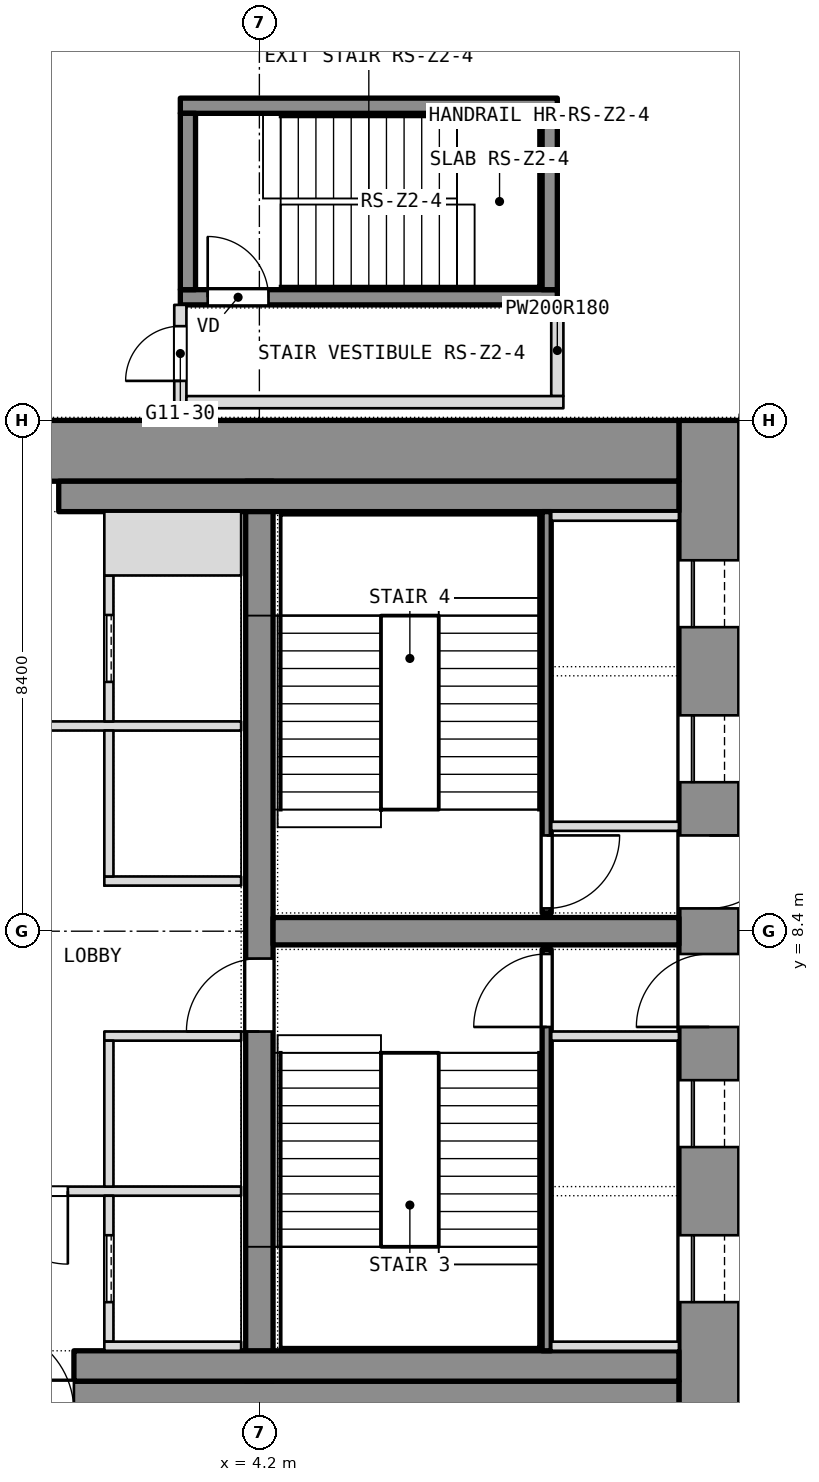
"""IFC4 building model, lengths in metres.
Left out: names, types, materials, properties, quantities, classifications, styles, units other than length and angle.
Written with IfcOpenShell. Run it as: python <this file> out.ifc"""

import sys

from ifc_helpers import new_model, si_unit, direction, frame, frame_2d, origin, place, context, subcontext, project, spatial, rectangle, extrude, element, fill, save


model = new_model("IFC4")
c1 = context("Model", 3, precision=1e-05, world=origin(), true_north=direction((0.0, 1.0)))
c2 = subcontext(c1, "Body", "Model", "MODEL_VIEW")
j1 = project(units=[si_unit("LENGTHUNIT", "METRE"), si_unit("PLANEANGLEUNIT", "RADIAN")], contexts=[c1])
p1 = place(None, origin())
s1 = spatial("IfcSite", under=j1, at=p1, CompositionType="ELEMENT")
p2 = place(p1, origin())
s2 = spatial("IfcBuilding", under=s1, at=p2, CompositionType="ELEMENT")
p3 = place(p2, frame((0.0, 0.0, 133.7)))
s3 = spatial("IfcBuildingStorey", under=s2, at=p3, CompositionType="ELEMENT", Elevation=133.7)
p4 = place(p3, frame((11.6, 0.0, 0.0), z_axis=(0.0, 0.0, 1.0), x_axis=(0.0, 1.0, 0.0)))
e1 = element("IfcWall", 1, at=p4, inside=s3, PredefinedType="SHEAR", context=c2, shape_type="SweptSolid", body=[
    extrude(rectangle(XDim=16.8, YDim=1.0, at=frame_2d((8.4, 0.0))), origin(), (0.0, 0.0, 1.0), 3.6),
])
p5 = place(p4, frame((2.3, 0.0, 0.0)))
e2 = element("IfcOpeningElement", 2, at=p5, cuts=e1, PredefinedType="OPENING", context=c2, shape_type="SweptSolid", body=[
    extrude(rectangle(XDim=1.1, YDim=2.1, at=frame_2d((0.55, 1.05))), frame((0.0, 0.5, 0.0), z_axis=(0.0, -1.0, 0.0), x_axis=(1.0, 0.0, 0.0)), (0.0, 0.0, 1.0), 1.0),
])
p6 = place(p4, frame((4.85, 0.0, 0.0)))
e3 = element("IfcOpeningElement", 3, at=p6, cuts=e1, PredefinedType="OPENING", context=c2, shape_type="SweptSolid", body=[
    extrude(rectangle(XDim=1.1, YDim=2.1, at=frame_2d((0.55, 1.05))), frame((0.0, 0.5, 0.0), z_axis=(0.0, -1.0, 0.0), x_axis=(1.0, 0.0, 0.0)), (0.0, 0.0, 1.0), 1.0),
])
p7 = place(p4, frame((6.825, 0.0, 0.0)))
e4 = element("IfcOpeningElement", 4, at=p7, cuts=e1, PredefinedType="OPENING", context=c2, shape_type="SweptSolid", body=[
    extrude(rectangle(XDim=1.2, YDim=2.1, at=frame_2d((0.6, 1.05))), frame((0.0, 0.5, 0.0), z_axis=(0.0, -1.0, 0.0), x_axis=(1.0, 0.0, 0.0)), (0.0, 0.0, 1.0), 1.0),
])
p8 = place(p4, frame((13.4, 0.0, 0.0)))
e5 = element("IfcOpeningElement", 5, at=p8, cuts=e1, PredefinedType="OPENING", context=c2, shape_type="SweptSolid", body=[
    extrude(rectangle(XDim=1.1, YDim=2.1, at=frame_2d((0.55, 1.05))), frame((0.0, 0.5, 0.0), z_axis=(0.0, -1.0, 0.0), x_axis=(1.0, 0.0, 0.0)), (0.0, 0.0, 1.0), 1.0),
])
p9 = place(p4, frame((10.85, 0.0, 0.0)))
e6 = element("IfcOpeningElement", 6, at=p9, cuts=e1, PredefinedType="OPENING", context=c2, shape_type="SweptSolid", body=[
    extrude(rectangle(XDim=1.1, YDim=2.1, at=frame_2d((0.55, 1.05))), frame((0.0, 0.5, 0.0), z_axis=(0.0, -1.0, 0.0), x_axis=(1.0, 0.0, 0.0)), (0.0, 0.0, 1.0), 1.0),
])
p10 = place(p4, frame((8.775, 0.0, 0.0)))
e7 = element("IfcOpeningElement", 7, at=p10, cuts=e1, PredefinedType="OPENING", context=c2, shape_type="SweptSolid", body=[
    extrude(rectangle(XDim=1.2, YDim=2.1, at=frame_2d((0.6, 1.05))), frame((0.0, 0.5, 0.0), z_axis=(0.0, -1.0, 0.0), x_axis=(1.0, 0.0, 0.0)), (0.0, 0.0, 1.0), 1.0),
])
p11 = place(p3, frame((-11.1, 0.5, 0.0), z_axis=(0.0, 0.0, 1.0), x_axis=(1.0, 0.0, 0.0)))
e8 = element("IfcWall", 8, at=p11, inside=s3, PredefinedType="SHEAR", context=c2, shape_type="SweptSolid", body=[
    extrude(rectangle(XDim=22.2, YDim=1.0, at=frame_2d((11.1, 0.0))), origin(), (0.0, 0.0, 1.0), 3.6),
])
p12 = place(p11, frame((10.85, 0.0, 0.0)))
e9 = element("IfcOpeningElement", 9, at=p12, cuts=e8, PredefinedType="OPENING", context=c2, shape_type="SweptSolid", body=[
    extrude(rectangle(XDim=1.4, YDim=2.1, at=frame_2d((0.7, 1.05))), frame((0.0, 0.5, 0.0), z_axis=(0.0, -1.0, 0.0), x_axis=(1.0, 0.0, 0.0)), (0.0, 0.0, 1.0), 1.0),
])
p13 = place(p3, frame((-11.1, 16.3, 0.0), z_axis=(0.0, 0.0, 1.0), x_axis=(1.0, 0.0, 0.0)))
e10 = element("IfcWall", 10, at=p13, inside=s3, PredefinedType="SHEAR", context=c2, shape_type="SweptSolid", body=[
    extrude(rectangle(XDim=22.2, YDim=1.0, at=frame_2d((11.1, 0.0))), origin(), (0.0, 0.0, 1.0), 3.6),
])
p14 = place(p13, frame((10.4, 0.0, 0.0)))
e11 = element("IfcOpeningElement", 11, at=p14, cuts=e10, PredefinedType="OPENING", context=c2, shape_type="SweptSolid", body=[
    extrude(rectangle(XDim=1.4, YDim=2.1, at=frame_2d((0.7, 1.05))), frame((0.0, 0.5, 0.0), z_axis=(0.0, -1.0, 0.0), x_axis=(1.0, 0.0, 0.0)), (0.0, 0.0, 1.0), 1.0),
])
p15 = place(p3, frame((4.2, 1.0, 0.0), z_axis=(0.0, 0.0, 1.0), x_axis=(0.0, 1.0, 0.0)))
e12 = element("IfcWall", 12, at=p15, inside=s3, PredefinedType="SHEAR", context=c2, shape_type="SweptSolid", body=[
    extrude(rectangle(XDim=14.8, YDim=0.45, at=frame_2d((7.4, 0.0))), origin(), (0.0, 0.0, 1.0), 3.6),
])
p16 = place(p15, frame((5.75, 0.0, 0.0)))
e13 = element("IfcOpeningElement", 13, at=p16, cuts=e12, PredefinedType="OPENING", context=c2, shape_type="SweptSolid", body=[
    extrude(rectangle(XDim=1.2, YDim=2.1, at=frame_2d((0.6, 1.05))), frame((0.0, 0.225, 0.0), z_axis=(0.0, -1.0, 0.0), x_axis=(1.0, 0.0, 0.0)), (0.0, 0.0, 1.0), 0.45),
])
p17 = place(p3, frame((4.425, 8.4, 0.0), z_axis=(0.0, 0.0, 1.0), x_axis=(1.0, 0.0, 0.0)))
e14 = element("IfcWall", 14, at=p17, inside=s3, PredefinedType="SHEAR", context=c2, shape_type="SweptSolid", body=[
    extrude(rectangle(XDim=6.675, YDim=0.45, at=frame_2d((3.337, 0.0))), origin(), (0.0, 0.0, 1.0), 3.6),
])
p18 = place(p3, frame((9.1, 17.2, 0.0), z_axis=(0.0, 0.0, 1.0), x_axis=(0.0, 1.0, 0.0)))
e15 = element("IfcWall", 15, at=p18, inside=s3, PredefinedType="PARTITIONING", context=c2, shape_type="SweptSolid", body=[
    extrude(rectangle(XDim=1.5, YDim=0.2, at=frame_2d((0.75, 0.0))), origin(), (0.0, 0.0, 1.0), 3.34),
])
p19 = place(p3, frame((2.9, 17.0, 0.0), z_axis=(0.0, 0.0, 1.0), x_axis=(0.0, 1.0, 0.0)))
e16 = element("IfcWall", 16, at=p19, inside=s3, PredefinedType="PARTITIONING", context=c2, shape_type="SweptSolid", body=[
    extrude(rectangle(XDim=1.7, YDim=0.2, at=frame_2d((0.85, 0.0))), origin(), (0.0, 0.0, 1.0), 3.34),
])
p20 = place(p19, frame((0.45, 0.0, 0.0)))
e17 = element("IfcOpeningElement", 17, at=p20, cuts=e16, PredefinedType="OPENING", context=c2, shape_type="SweptSolid", body=[
    extrude(rectangle(XDim=0.9, YDim=2.1, at=frame_2d((0.45, 1.05))), frame((0.0, 0.1, 0.0), z_axis=(0.0, -1.0, 0.0), x_axis=(1.0, 0.0, 0.0)), (0.0, 0.0, 1.0), 0.2),
])
p21 = place(p3, frame((3.0, 17.1, 0.0), z_axis=(0.0, 0.0, 1.0), x_axis=(1.0, 0.0, 0.0)))
e18 = element("IfcWall", 18, at=p21, inside=s3, PredefinedType="PARTITIONING", context=c2, shape_type="SweptSolid", body=[
    extrude(rectangle(XDim=6.2, YDim=0.2, at=frame_2d((3.1, 0.0))), origin(), (0.0, 0.0, 1.0), 3.34),
])
p22 = place(p3, frame((1.15, 1.25, 0.0), z_axis=(0.0, 0.0, 1.0), x_axis=(1.0, 0.0, 0.0)))
e19 = element("IfcWall", 19, at=p22, inside=s3, PredefinedType="PARTITIONING", context=c2, shape_type="SweptSolid", body=[
    extrude(rectangle(XDim=9.95, YDim=0.5, at=frame_2d((4.975, 0.0))), origin(), (0.0, 0.0, 1.0), 3.34),
])
p23 = place(p3, frame((0.9, 15.55, 0.0), z_axis=(0.0, 0.0, 1.0), x_axis=(1.0, 0.0, 0.0)))
e20 = element("IfcWall", 20, at=p23, inside=s3, PredefinedType="PARTITIONING", context=c2, shape_type="SweptSolid", body=[
    extrude(rectangle(XDim=10.2, YDim=0.5, at=frame_2d((5.1, 0.0))), origin(), (0.0, 0.0, 1.0), 3.34),
])
p24 = place(p3, frame((8.925, 1.5, 0.0), z_axis=(0.0, 0.0, 1.0), x_axis=(0.0, 1.0, 0.0)))
e21 = element("IfcWall", 21, at=p24, inside=s3, PredefinedType="SHEAR", context=c2, shape_type="SweptSolid", body=[
    extrude(rectangle(XDim=6.6, YDim=0.15, at=frame_2d((3.3, 0.0))), origin(), (0.0, 0.0, 1.0), 3.34),
])
p25 = place(p24, frame((5.325, 0.0, 0.0)))
e22 = element("IfcOpeningElement", 22, at=p25, cuts=e21, PredefinedType="OPENING", context=c2, shape_type="SweptSolid", body=[
    extrude(rectangle(XDim=1.2, YDim=2.1, at=frame_2d((0.6, 1.05))), frame((0.0, 0.075, 0.0), z_axis=(0.0, -1.0, 0.0), x_axis=(1.0, 0.0, 0.0)), (0.0, 0.0, 1.0), 0.15),
])
for number, where, z_axis, x_axis in (
    (23, (9.0, 6.675, 0.0), (0.0, 0.0, 1.0), (1.0, 0.0, 0.0)),
    (24, (9.0, 1.575, 0.0), (0.0, 0.0, 1.0), (1.0, 0.0, 0.0)),
):
    element("IfcWall", number, at=place(p3, frame(where, z_axis=z_axis, x_axis=x_axis)), inside=s3, PredefinedType="SHEAR", context=c2, shape_type="SweptSolid", body=[
        extrude(rectangle(XDim=2.1, YDim=0.15, at=frame_2d((1.05, 0.0))), origin(), (0.0, 0.0, 1.0), 3.6),
    ])
p26 = place(p3, frame((8.925, 8.7, 0.0), z_axis=(0.0, 0.0, 1.0), x_axis=(0.0, 1.0, 0.0)))
e25 = element("IfcWall", 25, at=p26, inside=s3, PredefinedType="SHEAR", context=c2, shape_type="SweptSolid", body=[
    extrude(rectangle(XDim=6.6, YDim=0.15, at=frame_2d((3.3, 0.0))), origin(), (0.0, 0.0, 1.0), 3.34),
])
p27 = place(p26, frame((0.075, 0.0, 0.0)))
e26 = element("IfcOpeningElement", 26, at=p27, cuts=e25, PredefinedType="OPENING", context=c2, shape_type="SweptSolid", body=[
    extrude(rectangle(XDim=1.2, YDim=2.1, at=frame_2d((0.6, 1.05))), frame((0.0, 0.075, 0.0), z_axis=(0.0, -1.0, 0.0), x_axis=(1.0, 0.0, 0.0)), (0.0, 0.0, 1.0), 0.15),
])
for number, where, z_axis, x_axis in (
    (27, (9.0, 10.125, 0.0), (0.0, 0.0, 1.0), (1.0, 0.0, 0.0)),
    (28, (9.0, 15.225, 0.0), (0.0, 0.0, 1.0), (1.0, 0.0, 0.0)),
):
    element("IfcWall", number, at=place(p3, frame(where, z_axis=z_axis, x_axis=x_axis)), inside=s3, PredefinedType="SHEAR", context=c2, shape_type="SweptSolid", body=[
        extrude(rectangle(XDim=2.1, YDim=0.15, at=frame_2d((1.05, 0.0))), origin(), (0.0, 0.0, 1.0), 3.6),
    ])
p28 = place(p3, frame((-3.9, 4.125, 0.0), z_axis=(0.0, 0.0, 1.0), x_axis=(1.0, 0.0, 0.0)))
e29 = element("IfcWall", 29, at=p28, inside=s3, PredefinedType="PARTITIONING", context=c2, shape_type="SweptSolid", body=[
    extrude(rectangle(XDim=7.8, YDim=0.15, at=frame_2d((3.9, 0.0))), origin(), (0.0, 0.0, 1.0), 3.34),
])
p29 = place(p28, frame((3.75, 0.0, 0.0)))
e30 = element("IfcOpeningElement", 30, at=p29, cuts=e29, PredefinedType="OPENING", context=c2, shape_type="SweptSolid", body=[
    extrude(rectangle(XDim=1.2, YDim=2.1, at=frame_2d((0.6, 1.05))), frame((0.0, 0.075, 0.0), z_axis=(0.0, -1.0, 0.0), x_axis=(1.0, 0.0, 0.0)), (0.0, 0.0, 1.0), 0.15),
])
p30 = place(p3, frame((-3.9, 11.775, 0.0), z_axis=(0.0, 0.0, 1.0), x_axis=(1.0, 0.0, 0.0)))
e31 = element("IfcWall", 31, at=p30, inside=s3, PredefinedType="PARTITIONING", context=c2, shape_type="SweptSolid", body=[
    extrude(rectangle(XDim=7.8, YDim=0.15, at=frame_2d((3.9, 0.0))), origin(), (0.0, 0.0, 1.0), 3.34),
])
p31 = place(p30, frame((3.3, 0.0, 0.0)))
e32 = element("IfcOpeningElement", 32, at=p31, cuts=e31, PredefinedType="OPENING", context=c2, shape_type="SweptSolid", body=[
    extrude(rectangle(XDim=1.2, YDim=2.1, at=frame_2d((0.6, 1.05))), frame((0.0, 0.075, 0.0), z_axis=(0.0, -1.0, 0.0), x_axis=(1.0, 0.0, 0.0)), (0.0, 0.0, 1.0), 0.15),
])
p32 = place(p3, frame((1.725, 1.65, 0.0), z_axis=(0.0, 0.0, 1.0), x_axis=(0.0, 1.0, 0.0)))
e33 = element("IfcWall", 33, at=p32, inside=s3, PredefinedType="SHEAR", context=c2, shape_type="SweptSolid", body=[
    extrude(rectangle(XDim=2.4, YDim=0.15, at=frame_2d((1.2, 0.0))), origin(), (0.0, 0.0, 1.0), 3.6),
])
p33 = place(p32, frame((0.65, 0.0, 0.0)))
e34 = element("IfcOpeningElement", 34, at=p33, cuts=e33, PredefinedType="OPENING", context=c2, shape_type="SweptSolid", body=[
    extrude(rectangle(XDim=1.1, YDim=2.1, at=frame_2d((0.55, 1.05))), frame((0.0, 0.075, 0.0), z_axis=(0.0, -1.0, 0.0), x_axis=(1.0, 0.0, 0.0)), (0.0, 0.0, 1.0), 0.15),
])
p34 = place(p3, frame((1.65, 1.575, 0.0), z_axis=(0.0, 0.0, 1.0), x_axis=(1.0, 0.0, 0.0)))
e35 = element("IfcWall", 35, at=p34, inside=s3, PredefinedType="SHEAR", context=c2, shape_type="SweptSolid", body=[
    extrude(rectangle(XDim=2.25, YDim=0.15, at=frame_2d((1.125, 0.0))), origin(), (0.0, 0.0, 1.0), 3.6),
])
p35 = place(p3, frame((1.725, 11.85, 0.0), z_axis=(0.0, 0.0, 1.0), x_axis=(0.0, 1.0, 0.0)))
e36 = element("IfcWall", 36, at=p35, inside=s3, PredefinedType="SHEAR", context=c2, shape_type="SweptSolid", body=[
    extrude(rectangle(XDim=2.4, YDim=0.15, at=frame_2d((1.2, 0.0))), origin(), (0.0, 0.0, 1.0), 3.6),
])
p36 = place(p35, frame((0.65, 0.0, 0.0)))
e37 = element("IfcOpeningElement", 37, at=p36, cuts=e36, PredefinedType="OPENING", context=c2, shape_type="SweptSolid", body=[
    extrude(rectangle(XDim=1.1, YDim=2.1, at=frame_2d((0.55, 1.05))), frame((0.0, 0.075, 0.0), z_axis=(0.0, -1.0, 0.0), x_axis=(1.0, 0.0, 0.0)), (0.0, 0.0, 1.0), 0.15),
])
p37 = place(p3, frame((1.65, 14.775, 0.0), z_axis=(0.0, 0.0, 1.0), x_axis=(1.0, 0.0, 0.0)))
e38 = element("IfcWall", 38, at=p37, inside=s3, PredefinedType="SHEAR", context=c2, shape_type="SweptSolid", body=[
    extrude(rectangle(XDim=2.25, YDim=1.05, at=frame_2d((1.125, 0.0))), origin(), (0.0, 0.0, 1.0), 3.6),
])
for number, where, z_axis, x_axis in (
    (39, (1.65, 6.675, 0.0), (0.0, 0.0, 1.0), (1.0, 0.0, 0.0)),
    (40, (1.65, 9.225, 0.0), (0.0, 0.0, 1.0), (1.0, 0.0, 0.0)),
):
    element("IfcWall", number, at=place(p3, frame(where, z_axis=z_axis, x_axis=x_axis)), inside=s3, PredefinedType="SHEAR", context=c2, shape_type="SweptSolid", body=[
        extrude(rectangle(XDim=2.25, YDim=0.15, at=frame_2d((1.125, 0.0))), origin(), (0.0, 0.0, 1.0), 3.6),
    ])
p38 = place(p3, frame((1.725, 4.2, 0.0), z_axis=(0.0, 0.0, 1.0), x_axis=(0.0, 1.0, 0.0)))
e41 = element("IfcWall", 41, at=p38, inside=s3, PredefinedType="SHEAR", context=c2, shape_type="SweptSolid", body=[
    extrude(rectangle(XDim=2.4, YDim=0.15, at=frame_2d((1.2, 0.0))), origin(), (0.0, 0.0, 1.0), 3.6),
])
p39 = place(p3, frame((1.725, 9.3, 0.0), z_axis=(0.0, 0.0, 1.0), x_axis=(0.0, 1.0, 0.0)))
e42 = element("IfcWall", 42, at=p39, inside=s3, PredefinedType="SHEAR", context=c2, shape_type="SweptSolid", body=[
    extrude(rectangle(XDim=2.4, YDim=0.15, at=frame_2d((1.2, 0.0))), origin(), (0.0, 0.0, 1.0), 3.6),
])
p40 = place(p3, frame((12.1, 16.8, 0.0), z_axis=(0.0, 0.0, 1.0), x_axis=(1.0, 0.0, 0.0)))
e43 = element("IfcWall", 43, at=p40, inside=s3, PredefinedType="PARTITIONING", context=c2, shape_type="SweptSolid", body=[
    extrude(rectangle(XDim=4.6, YDim=0.2, at=frame_2d((2.3, 0.0))), origin(), (0.0, 0.0, 1.0), 2.89),
])
p41 = place(p40, frame((0.3, 0.0, 0.0)))
e44 = element("IfcOpeningElement", 44, at=p41, cuts=e43, PredefinedType="OPENING", context=c2, shape_type="SweptSolid", body=[
    extrude(rectangle(XDim=1.2, YDim=2.1, at=frame_2d((0.6, 1.05))), frame((0.0, 0.1, 0.0), z_axis=(0.0, -1.0, 0.0), x_axis=(1.0, 0.0, 0.0)), (0.0, 0.0, 1.0), 0.2),
])
p42 = place(p3, frame((2.9, 18.825, 0.1), z_axis=(0.0, 0.0, 1.0), x_axis=(1.0, 0.0, 0.0)))
e45 = element("IfcWall", 45, at=p42, inside=s3, PredefinedType="SHEAR", context=c2, shape_type="SweptSolid", body=[
    extrude(rectangle(XDim=6.2, YDim=0.25, at=frame_2d((3.1, 0.0))), origin(), (0.0, 0.0, 1.0), 3.6),
])
p43 = place(p42, frame((0.45, 0.0, 0.0)))
e46 = element("IfcOpeningElement", 46, at=p43, cuts=e45, PredefinedType="OPENING", context=c2, shape_type="SweptSolid", body=[
    extrude(rectangle(XDim=1.0, YDim=2.1, at=frame_2d((0.5, 1.05))), frame((0.0, 0.125, 0.0), z_axis=(0.0, -1.0, 0.0), x_axis=(1.0, 0.0, 0.0)), (0.0, 0.0, 1.0), 0.25),
])
p44 = place(p3, frame((2.9, 21.975, 0.1), z_axis=(0.0, 0.0, 1.0), x_axis=(1.0, 0.0, 0.0)))
e47 = element("IfcWall", 47, at=p44, inside=s3, PredefinedType="SHEAR", context=c2, shape_type="SweptSolid", body=[
    extrude(rectangle(XDim=6.2, YDim=0.25, at=frame_2d((3.1, 0.0))), origin(), (0.0, 0.0, 1.0), 3.6),
])
for number, where, z_axis, x_axis in (
    (48, (3.025, 18.95, 0.1), (0.0, 0.0, 1.0), (0.0, 1.0, 0.0)),
    (49, (8.975, 18.95, 0.1), (0.0, 0.0, 1.0), (0.0, 1.0, 0.0)),
):
    element("IfcWall", number, at=place(p3, frame(where, z_axis=z_axis, x_axis=x_axis)), inside=s3, PredefinedType="SHEAR", context=c2, shape_type="SweptSolid", body=[
        extrude(rectangle(XDim=2.9, YDim=0.25, at=frame_2d((1.45, 0.0))), origin(), (0.0, 0.0, 1.0), 3.6),
    ])
p45 = place(p20, origin())
e50 = element("IfcDoor", 50, at=p45, inside=s3, OperationType="SINGLE_SWING_RIGHT", PredefinedType="DOOR", context=c2, shape_type="SweptSolid", body=[
    extrude(rectangle(XDim=0.9, YDim=2.1, at=frame_2d((0.45, 1.05))), frame((0.0, 0.025, 0.0), z_axis=(0.0, -1.0, 0.0), x_axis=(1.0, 0.0, 0.0)), (0.0, 0.0, 1.0), 0.05),
])
fill(e17, e50)
p46 = place(p43, origin())
e51 = element("IfcDoor", 51, at=p46, inside=s3, OperationType="SINGLE_SWING_LEFT", PredefinedType="DOOR", context=c2, shape_type="SweptSolid", body=[
    extrude(rectangle(XDim=1.0, YDim=2.1, at=frame_2d((0.5, 1.05))), frame((0.0, 0.025, 0.0), z_axis=(0.0, -1.0, 0.0), x_axis=(1.0, 0.0, 0.0)), (0.0, 0.0, 1.0), 0.05),
])
fill(e46, e51)
p47 = place(p5, origin())
e52 = element("IfcDoor", 52, at=p47, inside=s3, OperationType="SLIDING_TO_LEFT", PredefinedType="DOOR", context=c2, shape_type="SweptSolid", body=[
    extrude(rectangle(XDim=1.1, YDim=2.1, at=frame_2d((0.55, 1.05))), frame((0.0, 0.025, 0.0), z_axis=(0.0, -1.0, 0.0), x_axis=(1.0, 0.0, 0.0)), (0.0, 0.0, 1.0), 0.05),
])
fill(e2, e52)
p48 = place(p6, origin())
e53 = element("IfcDoor", 53, at=p48, inside=s3, OperationType="SLIDING_TO_LEFT", PredefinedType="DOOR", context=c2, shape_type="SweptSolid", body=[
    extrude(rectangle(XDim=1.1, YDim=2.1, at=frame_2d((0.55, 1.05))), frame((0.0, 0.025, 0.0), z_axis=(0.0, -1.0, 0.0), x_axis=(1.0, 0.0, 0.0)), (0.0, 0.0, 1.0), 0.05),
])
fill(e3, e53)
p49 = place(p7, origin())
e54 = element("IfcDoor", 54, at=p49, inside=s3, OperationType="SINGLE_SWING_LEFT", PredefinedType="DOOR", context=c2, shape_type="SweptSolid", body=[
    extrude(rectangle(XDim=1.2, YDim=2.1, at=frame_2d((0.6, 1.05))), frame((0.0, 0.025, 0.0), z_axis=(0.0, -1.0, 0.0), x_axis=(1.0, 0.0, 0.0)), (0.0, 0.0, 1.0), 0.05),
])
fill(e4, e54)
p50 = place(p25, origin())
e55 = element("IfcDoor", 55, at=p50, inside=s3, OperationType="SINGLE_SWING_LEFT", PredefinedType="DOOR", context=c2, shape_type="SweptSolid", body=[
    extrude(rectangle(XDim=1.2, YDim=2.1, at=frame_2d((0.6, 1.05))), frame((0.0, 0.025, 0.0), z_axis=(0.0, -1.0, 0.0), x_axis=(1.0, 0.0, 0.0)), (0.0, 0.0, 1.0), 0.05),
])
fill(e22, e55)
p51 = place(p8, origin())
e56 = element("IfcDoor", 56, at=p51, inside=s3, OperationType="SLIDING_TO_LEFT", PredefinedType="DOOR", context=c2, shape_type="SweptSolid", body=[
    extrude(rectangle(XDim=1.1, YDim=2.1, at=frame_2d((0.55, 1.05))), frame((0.0, 0.025, 0.0), z_axis=(0.0, -1.0, 0.0), x_axis=(1.0, 0.0, 0.0)), (0.0, 0.0, 1.0), 0.05),
])
fill(e5, e56)
p52 = place(p9, origin())
e57 = element("IfcDoor", 57, at=p52, inside=s3, OperationType="SLIDING_TO_LEFT", PredefinedType="DOOR", context=c2, shape_type="SweptSolid", body=[
    extrude(rectangle(XDim=1.1, YDim=2.1, at=frame_2d((0.55, 1.05))), frame((0.0, 0.025, 0.0), z_axis=(0.0, -1.0, 0.0), x_axis=(1.0, 0.0, 0.0)), (0.0, 0.0, 1.0), 0.05),
])
fill(e6, e57)
p53 = place(p10, origin())
e58 = element("IfcDoor", 58, at=p53, inside=s3, OperationType="SINGLE_SWING_LEFT", PredefinedType="DOOR", context=c2, shape_type="SweptSolid", body=[
    extrude(rectangle(XDim=1.2, YDim=2.1, at=frame_2d((0.6, 1.05))), frame((0.0, 0.025, 0.0), z_axis=(0.0, -1.0, 0.0), x_axis=(1.0, 0.0, 0.0)), (0.0, 0.0, 1.0), 0.05),
])
fill(e7, e58)
p54 = place(p27, origin())
e59 = element("IfcDoor", 59, at=p54, inside=s3, OperationType="SINGLE_SWING_LEFT", PredefinedType="DOOR", context=c2, shape_type="SweptSolid", body=[
    extrude(rectangle(XDim=1.2, YDim=2.1, at=frame_2d((0.6, 1.05))), frame((0.0, 0.025, 0.0), z_axis=(0.0, -1.0, 0.0), x_axis=(1.0, 0.0, 0.0)), (0.0, 0.0, 1.0), 0.05),
])
fill(e26, e59)
p55 = place(p33, origin())
e60 = element("IfcDoor", 60, at=p55, inside=s3, OperationType="SLIDING_TO_LEFT", PredefinedType="DOOR", context=c2, shape_type="SweptSolid", body=[
    extrude(rectangle(XDim=1.1, YDim=2.1, at=frame_2d((0.55, 1.05))), frame((0.0, 0.025, 0.0), z_axis=(0.0, -1.0, 0.0), x_axis=(1.0, 0.0, 0.0)), (0.0, 0.0, 1.0), 0.05),
])
fill(e34, e60)
p56 = place(p36, origin())
e61 = element("IfcDoor", 61, at=p56, inside=s3, OperationType="SLIDING_TO_LEFT", PredefinedType="DOOR", context=c2, shape_type="SweptSolid", body=[
    extrude(rectangle(XDim=1.1, YDim=2.1, at=frame_2d((0.55, 1.05))), frame((0.0, 0.025, 0.0), z_axis=(0.0, -1.0, 0.0), x_axis=(1.0, 0.0, 0.0)), (0.0, 0.0, 1.0), 0.05),
])
fill(e37, e61)
p57 = place(p29, origin())
e62 = element("IfcDoor", 62, at=p57, inside=s3, OperationType="SINGLE_SWING_LEFT", PredefinedType="DOOR", context=c2, shape_type="SweptSolid", body=[
    extrude(rectangle(XDim=1.2, YDim=2.1, at=frame_2d((0.6, 1.05))), frame((0.0, 0.025, 0.0), z_axis=(0.0, -1.0, 0.0), x_axis=(1.0, 0.0, 0.0)), (0.0, 0.0, 1.0), 0.05),
])
fill(e30, e62)
p58 = place(p16, origin())
e63 = element("IfcDoor", 63, at=p58, inside=s3, OperationType="SINGLE_SWING_LEFT", PredefinedType="DOOR", context=c2, shape_type="SweptSolid", body=[
    extrude(rectangle(XDim=1.2, YDim=2.1, at=frame_2d((0.6, 1.05))), frame((0.0, 0.025, 0.0), z_axis=(0.0, -1.0, 0.0), x_axis=(1.0, 0.0, 0.0)), (0.0, 0.0, 1.0), 0.05),
])
fill(e13, e63)
save(model, sys.argv[1])
